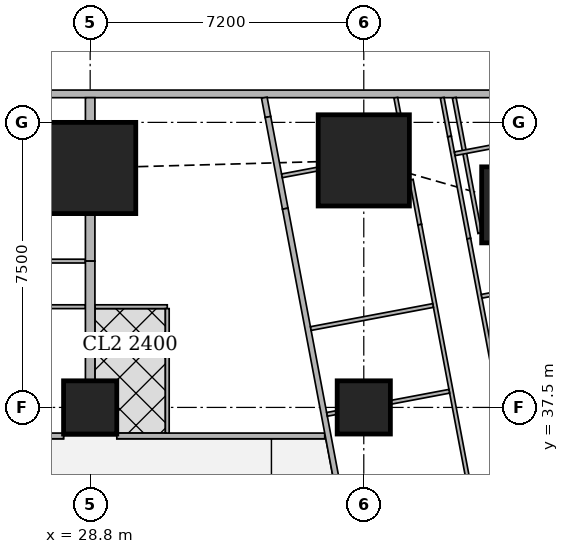
"""IFC4 building model, lengths in metres.
Left out: names, types, materials, properties, quantities, classifications, styles, units other than length and angle.
Written with IfcOpenShell. Run it as: python <this file> out.ifc"""

import sys

from ifc_helpers import new_model, si_unit, direction, frame, frame_2d, origin, origin_2d, place, context, subcontext, project, spatial, rectangle, extrude, element, fill, save


model = new_model("IFC4")
c1 = context("Model", 3, precision=1e-05, world=origin(), true_north=direction((0.0, 1.0)))
c2 = subcontext(c1, "Body", "Model", "MODEL_VIEW")
j1 = project(units=[si_unit("LENGTHUNIT", "METRE"), si_unit("PLANEANGLEUNIT", "RADIAN")], contexts=[c1])
p1 = place(None, origin())
s1 = spatial("IfcSite", under=j1, at=p1, CompositionType="ELEMENT")
p2 = place(p1, origin())
s2 = spatial("IfcBuilding", under=s1, at=p2, CompositionType="ELEMENT")
p3 = place(p2, frame((0.0, 0.0, 193.7)))
s3 = spatial("IfcBuildingStorey", under=s2, at=p3, CompositionType="ELEMENT", Elevation=193.7)
for number, where, z_axis, x_axis in (
    (1, (28.8, 37.5, 0.0), (0.0, 0.0, 1.0), (1.0, 0.0, 0.0)),
    (2, (36.0, 37.5, 0.0), (0.0, 0.0, 1.0), (1.0, 0.0, 0.0)),
):
    element("IfcColumn", number, at=place(p3, frame(where, z_axis=z_axis, x_axis=x_axis)), inside=s3, PredefinedType="COLUMN", context=c2, shape_type="SweptSolid", body=[
        extrude(rectangle(XDim=1.4, YDim=1.4, at=origin_2d()), origin(), (0.0, 0.0, 1.0), 3.75),
    ])
p4 = place(p3, frame((40.102, 42.83, 0.0), z_axis=(0.0, 0.0, 1.0), x_axis=(1.0, 0.0, 0.0)))
e3 = element("IfcColumn", 3, at=p4, inside=s3, PredefinedType="COLUMN", context=c2, shape_type="SweptSolid", body=[
    extrude(rectangle(XDim=2.0, YDim=2.0, at=origin_2d()), origin(), (0.0, 0.0, 1.0), 3.75),
])
for number, where, z_axis, x_axis in (
    (4, (28.8, 43.8, 0.0), (0.0, 0.0, 1.0), (1.0, 0.0, 0.0)),
    (5, (36.0, 44.0, 0.0), (0.0, 0.0, 1.0), (1.0, 0.0, 0.0)),
):
    element("IfcColumn", number, at=place(p3, frame(where, z_axis=z_axis, x_axis=x_axis)), inside=s3, PredefinedType="COLUMN", context=c2, shape_type="SweptSolid", body=[
        extrude(rectangle(XDim=2.4, YDim=2.4, at=origin_2d()), origin(), (0.0, 0.0, 1.0), 3.75),
    ])
p5 = place(p3, frame((40.106, 45.75, 0.0), z_axis=(0.0, 0.0, 1.0), x_axis=(-1.0, 0.0, 0.0)))
e6 = element("IfcWall", 6, at=p5, inside=s3, PredefinedType="SOLIDWALL", context=c2, shape_type="SweptSolid", body=[
    extrude(rectangle(XDim=32.743, YDim=0.2, at=frame_2d((16.372, 0.0))), origin(), (0.0, 0.0, 1.0), 3.5),
])
p6 = place(p5, frame((8.606, 0.0, 0.9)))
e7 = element("IfcOpeningElement", 7, at=p6, cuts=e6, PredefinedType="OPENING", context=c2, shape_type="SweptSolid", body=[
    extrude(rectangle(XDim=1.8, YDim=1.5, at=frame_2d((0.9, 0.75))), frame((0.0, 0.11, 0.0), z_axis=(0.0, -1.0, 0.0), x_axis=(1.0, 0.0, 0.0)), (0.0, 0.0, 1.0), 0.22),
])
p7 = place(p5, frame((12.206, 0.0, 0.9)))
e8 = element("IfcOpeningElement", 8, at=p7, cuts=e6, PredefinedType="OPENING", context=c2, shape_type="SweptSolid", body=[
    extrude(rectangle(XDim=1.8, YDim=1.5, at=frame_2d((0.9, 0.75))), frame((0.0, 0.11, 0.0), z_axis=(0.0, -1.0, 0.0), x_axis=(1.0, 0.0, 0.0)), (0.0, 0.0, 1.0), 0.22),
])
p8 = place(p5, frame((15.806, 0.0, 0.9)))
e9 = element("IfcOpeningElement", 9, at=p8, cuts=e6, PredefinedType="OPENING", context=c2, shape_type="SweptSolid", body=[
    extrude(rectangle(XDim=1.8, YDim=1.5, at=frame_2d((0.9, 0.75))), frame((0.0, 0.11, 0.0), z_axis=(0.0, -1.0, 0.0), x_axis=(1.0, 0.0, 0.0)), (0.0, 0.0, 1.0), 0.22),
])
p9 = place(p5, frame((19.406, 0.0, 0.9)))
e10 = element("IfcOpeningElement", 10, at=p9, cuts=e6, PredefinedType="OPENING", context=c2, shape_type="SweptSolid", body=[
    extrude(rectangle(XDim=1.8, YDim=1.5, at=frame_2d((0.9, 0.75))), frame((0.0, 0.11, 0.0), z_axis=(0.0, -1.0, 0.0), x_axis=(1.0, 0.0, 0.0)), (0.0, 0.0, 1.0), 0.22),
])
p10 = place(p5, frame((23.006, 0.0, 0.9)))
e11 = element("IfcOpeningElement", 11, at=p10, cuts=e6, PredefinedType="OPENING", context=c2, shape_type="SweptSolid", body=[
    extrude(rectangle(XDim=1.8, YDim=1.5, at=frame_2d((0.9, 0.75))), frame((0.0, 0.11, 0.0), z_axis=(0.0, -1.0, 0.0), x_axis=(1.0, 0.0, 0.0)), (0.0, 0.0, 1.0), 0.22),
])
p11 = place(p5, frame((28.025, 0.0, 0.9)))
e12 = element("IfcOpeningElement", 12, at=p11, cuts=e6, PredefinedType="OPENING", context=c2, shape_type="SweptSolid", body=[
    extrude(rectangle(XDim=2.4, YDim=1.5, at=frame_2d((1.2, 0.75))), frame((0.0, 0.11, 0.0), z_axis=(0.0, -1.0, 0.0), x_axis=(1.0, 0.0, 0.0)), (0.0, 0.0, 1.0), 0.22),
])
p12 = place(p3, frame((22.301, 36.75, 0.0), z_axis=(0.0, 0.0, 1.0), x_axis=(1.0, 0.0, 0.0)))
e13 = element("IfcWall", 13, at=p12, inside=s3, PredefinedType="SOLIDWALL", context=c2, shape_type="SweptSolid", body=[
    extrude(rectangle(XDim=5.798, YDim=0.15, at=frame_2d((2.899, 0.0))), origin(), (0.0, 0.0, 1.0), 3.5),
])
p13 = place(p3, frame((29.501, 36.75, 0.0), z_axis=(0.0, 0.0, 1.0), x_axis=(1.0, 0.0, 0.0)))
e14 = element("IfcWall", 14, at=p13, inside=s3, PredefinedType="SOLIDWALL", context=c2, shape_type="SweptSolid", body=[
    extrude(rectangle(XDim=5.471, YDim=0.15, at=frame_2d((2.735, 0.0))), origin(), (0.0, 0.0, 1.0), 3.5),
])
p14 = place(p13, frame((2.945, 0.0, 0.0)))
e15 = element("IfcOpeningElement", 15, at=p14, cuts=e14, PredefinedType="OPENING", context=c2, shape_type="SweptSolid", body=[
    extrude(rectangle(XDim=1.0, YDim=2.1, at=frame_2d((0.5, 1.05))), frame((0.0, 0.085, 0.0), z_axis=(0.0, -1.0, 0.0), x_axis=(1.0, 0.0, 0.0)), (0.0, 0.0, 1.0), 0.17),
])
p15 = place(p3, frame((33.382, 45.65, 0.0), z_axis=(0.0, 0.0, 1.0), x_axis=(0.185657456326, -0.982614527122, 0.0)))
e16 = element("IfcWall", 16, at=p15, inside=s3, PredefinedType="SOLIDWALL", context=c2, shape_type="SweptSolid", body=[
    extrude(rectangle(XDim=0.517, YDim=0.15, at=frame_2d((0.258, 0.0))), origin(), (0.0, 0.0, 1.0), 3.5),
])
p16 = place(p3, frame((33.478, 45.142, 0.0), z_axis=(0.0, 0.0, 1.0), x_axis=(0.185393362436, -0.982664388876, 0.0)))
e17 = element("IfcWall", 17, at=p16, inside=s3, PredefinedType="SOLIDWALL", context=c2, shape_type="SweptSolid", body=[
    extrude(rectangle(XDim=2.455, YDim=0.15, at=frame_2d((1.227, 0.0))), origin(), (0.0, 0.0, 1.0), 2.05),
])
p17 = place(p3, frame((33.933, 42.73, 0.0), z_axis=(0.0, 0.0, 1.0), x_axis=(0.185595417643, -0.982626246825, 0.0)))
e18 = element("IfcWall", 18, at=p17, inside=s3, PredefinedType="SOLIDWALL", context=c2, shape_type="SweptSolid", body=[
    extrude(rectangle(XDim=41.051, YDim=0.15, at=frame_2d((20.525, 0.0))), origin(), (0.0, 0.0, 1.0), 2.5),
])
p18 = place(p17, frame((16.082, 0.0, 0.0)))
e19 = element("IfcOpeningElement", 19, at=p18, cuts=e18, PredefinedType="OPENING", context=c2, shape_type="SweptSolid", body=[
    extrude(rectangle(XDim=1.0, YDim=2.1, at=frame_2d((0.5, 1.05))), frame((0.0, 0.085, 0.0), z_axis=(0.0, -1.0, 0.0), x_axis=(1.0, 0.0, 0.0)), (0.0, 0.0, 1.0), 0.17),
])
p19 = place(p17, frame((19.898, 0.0, 0.0)))
e20 = element("IfcOpeningElement", 20, at=p19, cuts=e18, PredefinedType="OPENING", context=c2, shape_type="SweptSolid", body=[
    extrude(rectangle(XDim=1.0, YDim=2.1, at=frame_2d((0.5, 1.05))), frame((0.0, 0.085, 0.0), z_axis=(0.0, -1.0, 0.0), x_axis=(1.0, 0.0, 0.0)), (0.0, 0.0, 1.0), 0.17),
])
p20 = place(p17, frame((30.862, 0.0, 0.0)))
e21 = element("IfcOpeningElement", 21, at=p20, cuts=e18, PredefinedType="OPENING", context=c2, shape_type="SweptSolid", body=[
    extrude(rectangle(XDim=1.0, YDim=2.1, at=frame_2d((0.5, 1.05))), frame((0.0, 0.085, 0.0), z_axis=(0.0, -1.0, 0.0), x_axis=(1.0, 0.0, 0.0)), (0.0, 0.0, 1.0), 0.17),
])
p21 = place(p3, frame((39.054, 42.085, 0.0), z_axis=(0.0, 0.0, 1.0), x_axis=(-0.185791584218, 0.982589175207, 0.0)))
e22 = element("IfcWall", 22, at=p21, inside=s3, PredefinedType="PARTITIONING", context=c2, shape_type="SweptSolid", body=[
    extrude(rectangle(XDim=3.628, YDim=0.1, at=frame_2d((1.814, 0.0))), origin(), (0.0, 0.0, 1.0), 2.05),
])
p22 = place(p3, frame((38.063, 45.65, 0.0), z_axis=(0.0, 0.0, 1.0), x_axis=(0.185677287841, -0.982610779902, 0.0)))
e23 = element("IfcWall", 23, at=p22, inside=s3, PredefinedType="PARTITIONING", context=c2, shape_type="SweptSolid", body=[
    extrude(rectangle(XDim=1.04, YDim=0.1, at=frame_2d((0.52, 0.0))), origin(), (0.0, 0.0, 1.0), 3.5),
])
p23 = place(p3, frame((38.256, 44.628, 0.0), z_axis=(0.0, 0.0, 1.0), x_axis=(0.185700639943, -0.982606366927, 0.0)))
e24 = element("IfcWall", 24, at=p23, inside=s3, PredefinedType="PARTITIONING", context=c2, shape_type="SweptSolid", body=[
    extrude(rectangle(XDim=2.735, YDim=0.1, at=frame_2d((1.367, 0.0))), origin(), (0.0, 0.0, 1.0), 2.05),
])
p24 = place(p3, frame((38.764, 41.941, 0.0), z_axis=(0.0, 0.0, 1.0), x_axis=(0.185512176227, -0.982641965556, 0.0)))
e25 = element("IfcWall", 25, at=p24, inside=s3, PredefinedType="PARTITIONING", context=c2, shape_type="SweptSolid", body=[
    extrude(rectangle(XDim=12.792, YDim=0.1, at=frame_2d((6.396, 0.0))), origin(), (0.0, 0.0, 1.0), 2.5),
])
p25 = place(p24, frame((11.35, 0.0, 0.0)))
e26 = element("IfcOpeningElement", 26, at=p25, cuts=e25, PredefinedType="OPENING", context=c2, shape_type="SweptSolid", body=[
    extrude(rectangle(XDim=0.9, YDim=2.1, at=frame_2d((0.45, 1.05))), frame((0.0, 0.06, 0.0), z_axis=(0.0, -1.0, 0.0), x_axis=(1.0, 0.0, 0.0)), (0.0, 0.0, 1.0), 0.12),
])
p26 = place(p24, frame((8.085, 0.0, 0.0)))
e27 = element("IfcOpeningElement", 27, at=p26, cuts=e25, PredefinedType="OPENING", context=c2, shape_type="SweptSolid", body=[
    extrude(rectangle(XDim=0.9, YDim=2.1, at=frame_2d((0.45, 1.05))), frame((0.0, 0.06, 0.0), z_axis=(0.0, -1.0, 0.0), x_axis=(1.0, 0.0, 0.0)), (0.0, 0.0, 1.0), 0.12),
])
p27 = place(p24, frame((3.7, 0.0, 0.0)))
e28 = element("IfcOpeningElement", 28, at=p27, cuts=e25, PredefinedType="OPENING", context=c2, shape_type="SweptSolid", body=[
    extrude(rectangle(XDim=0.9, YDim=2.1, at=frame_2d((0.45, 1.05))), frame((0.0, 0.06, 0.0), z_axis=(0.0, -1.0, 0.0), x_axis=(1.0, 0.0, 0.0)), (0.0, 0.0, 1.0), 0.12),
])
p28 = place(p3, frame((36.842, 45.65, 0.0), z_axis=(0.0, 0.0, 1.0), x_axis=(0.185407859198, -0.982661653748, 0.0)))
e29 = element("IfcWall", 29, at=p28, inside=s3, PredefinedType="PARTITIONING", context=c2, shape_type="SweptSolid", body=[
    extrude(rectangle(XDim=0.448, YDim=0.1, at=frame_2d((0.224, 0.0))), origin(), (0.0, 0.0, 1.0), 3.5),
])
p29 = place(p3, frame((37.249, 43.493, 0.0), z_axis=(0.0, 0.0, 1.0), x_axis=(0.185817643817, -0.982584247404, 0.0)))
e30 = element("IfcWall", 30, at=p29, inside=s3, PredefinedType="PARTITIONING", context=c2, shape_type="SweptSolid", body=[
    extrude(rectangle(XDim=1.205, YDim=0.1, at=frame_2d((0.603, 0.0))), origin(), (0.0, 0.0, 1.0), 2.05),
])
p30 = place(p3, frame((37.473, 42.309, 0.0), z_axis=(0.0, 0.0, 1.0), x_axis=(0.185570636839, -0.982630927024, 0.0)))
e31 = element("IfcWall", 31, at=p30, inside=s3, PredefinedType="PARTITIONING", context=c2, shape_type="SweptSolid", body=[
    extrude(rectangle(XDim=13.553, YDim=0.1, at=frame_2d((6.777, 0.0))), origin(), (0.0, 0.0, 1.0), 2.5),
])
p31 = place(p30, frame((12.049, 0.0, 0.0)))
e32 = element("IfcOpeningElement", 32, at=p31, cuts=e31, PredefinedType="OPENING", context=c2, shape_type="SweptSolid", body=[
    extrude(rectangle(XDim=0.9, YDim=2.1, at=frame_2d((0.45, 1.05))), frame((0.0, 0.06, 0.0), z_axis=(0.0, -1.0, 0.0), x_axis=(1.0, 0.0, 0.0)), (0.0, 0.0, 1.0), 0.12),
])
p32 = place(p30, frame((8.427, 0.0, 0.0)))
e33 = element("IfcOpeningElement", 33, at=p32, cuts=e31, PredefinedType="OPENING", context=c2, shape_type="SweptSolid", body=[
    extrude(rectangle(XDim=0.9, YDim=2.1, at=frame_2d((0.45, 1.05))), frame((0.0, 0.06, 0.0), z_axis=(0.0, -1.0, 0.0), x_axis=(1.0, 0.0, 0.0)), (0.0, 0.0, 1.0), 0.12),
])
p33 = place(p30, frame((2.853, 0.0, 0.0)))
e34 = element("IfcOpeningElement", 34, at=p33, cuts=e31, PredefinedType="OPENING", context=c2, shape_type="SweptSolid", body=[
    extrude(rectangle(XDim=0.9, YDim=2.1, at=frame_2d((0.45, 1.05))), frame((0.0, 0.06, 0.0), z_axis=(0.0, -1.0, 0.0), x_axis=(1.0, 0.0, 0.0)), (0.0, 0.0, 1.0), 0.12),
])
p34 = place(p30, frame((10.14, 0.0, 0.0)))
e35 = element("IfcOpeningElement", 35, at=p34, cuts=e31, PredefinedType="OPENING", context=c2, shape_type="SweptSolid", body=[
    extrude(rectangle(XDim=0.9, YDim=2.1, at=frame_2d((0.45, 1.05))), frame((0.0, 0.06, 0.0), z_axis=(0.0, -1.0, 0.0), x_axis=(1.0, 0.0, 0.0)), (0.0, 0.0, 1.0), 0.12),
])
p35 = place(p30, frame((5.759, 0.0, 0.0)))
e36 = element("IfcOpeningElement", 36, at=p35, cuts=e31, PredefinedType="OPENING", context=c2, shape_type="SweptSolid", body=[
    extrude(rectangle(XDim=0.9, YDim=2.1, at=frame_2d((0.45, 1.05))), frame((0.0, 0.06, 0.0), z_axis=(0.0, -1.0, 0.0), x_axis=(1.0, 0.0, 0.0)), (0.0, 0.0, 1.0), 0.12),
])
p36 = place(p3, frame((41.968, 44.85, 0.0), z_axis=(0.0, 0.0, 1.0), x_axis=(-0.98258614234, -0.185807623311, 0.0)))
e37 = element("IfcWall", 37, at=p36, inside=s3, PredefinedType="PARTITIONING", context=c2, shape_type="SweptSolid", body=[
    extrude(rectangle(XDim=3.638, YDim=0.1, at=frame_2d((1.819, 0.0))), origin(), (0.0, 0.0, 1.0), 2.05),
])
p37 = place(p3, frame((43.277, 41.212, 0.0), z_axis=(0.0, 0.0, 1.0), x_axis=(-0.982665405803, -0.185387972203, 0.0)))
e38 = element("IfcWall", 38, at=p37, inside=s3, PredefinedType="PARTITIONING", context=c2, shape_type="SweptSolid", body=[
    extrude(rectangle(XDim=4.25, YDim=0.1, at=frame_2d((2.125, 0.0))), origin(), (0.0, 0.0, 1.0), 2.05),
])
p38 = place(p3, frame((34.79, 43.772, 0.0), z_axis=(0.0, 0.0, 1.0), x_axis=(-0.982655532093, -0.185440301034, 0.0)))
e39 = element("IfcWall", 39, at=p38, inside=s3, PredefinedType="PARTITIONING", context=c2, shape_type="SweptSolid", body=[
    extrude(rectangle(XDim=0.96, YDim=0.1, at=frame_2d((0.48, 0.0))), origin(), (0.0, 0.0, 1.0), 2.05),
])
p39 = place(p3, frame((37.824, 40.182, 0.0), z_axis=(0.0, 0.0, 1.0), x_axis=(-0.982674977865, -0.185337227447, 0.0)))
e40 = element("IfcWall", 40, at=p39, inside=s3, PredefinedType="PARTITIONING", context=c2, shape_type="SweptSolid", body=[
    extrude(rectangle(XDim=3.275, YDim=0.1, at=frame_2d((1.637, 0.0))), origin(), (0.0, 0.0, 1.0), 3.5),
])
p40 = place(p3, frame((38.25, 37.925, 0.0), z_axis=(0.0, 0.0, 1.0), x_axis=(-0.982610209589, -0.185680305934, 0.0)))
e41 = element("IfcWall", 41, at=p40, inside=s3, PredefinedType="PARTITIONING", context=c2, shape_type="SweptSolid", body=[
    extrude(rectangle(XDim=1.567, YDim=0.1, at=frame_2d((0.784, 0.0))), origin(), (0.0, 0.0, 1.0), 3.5),
])
p41 = place(p3, frame((35.29, 37.366, 0.0), z_axis=(0.0, 0.0, 1.0), x_axis=(-0.982395465615, -0.18681313963, 0.0)))
e42 = element("IfcWall", 42, at=p41, inside=s3, PredefinedType="PARTITIONING", context=c2, shape_type="SweptSolid", body=[
    extrude(rectangle(XDim=0.263, YDim=0.1, at=frame_2d((0.131, 0.0))), origin(), (0.0, 0.0, 1.0), 3.5),
])
p42 = place(p3, frame((18.0, 41.35, 0.0), z_axis=(0.0, 0.0, 1.0), x_axis=(1.0, 0.0, 0.0)))
e43 = element("IfcWall", 43, at=p42, inside=s3, PredefinedType="PARTITIONING", context=c2, shape_type="SweptSolid", body=[
    extrude(rectangle(XDim=10.675, YDim=0.1, at=frame_2d((5.337, 0.0))), origin(), (0.0, 0.0, 1.0), 3.5),
])
p43 = place(p42, frame((0.2, 0.0, 0.0)))
e44 = element("IfcOpeningElement", 44, at=p43, cuts=e43, PredefinedType="OPENING", context=c2, shape_type="SweptSolid", body=[
    extrude(rectangle(XDim=0.9, YDim=2.1, at=frame_2d((0.45, 1.05))), frame((0.0, 0.06, 0.0), z_axis=(0.0, -1.0, 0.0), x_axis=(1.0, 0.0, 0.0)), (0.0, 0.0, 1.0), 0.12),
])
p44 = place(p42, frame((3.8, 0.0, 0.0)))
e45 = element("IfcOpeningElement", 45, at=p44, cuts=e43, PredefinedType="OPENING", context=c2, shape_type="SweptSolid", body=[
    extrude(rectangle(XDim=0.9, YDim=2.1, at=frame_2d((0.45, 1.05))), frame((0.0, 0.06, 0.0), z_axis=(0.0, -1.0, 0.0), x_axis=(1.0, 0.0, 0.0)), (0.0, 0.0, 1.0), 0.12),
])
p45 = place(p42, frame((7.4, 0.0, 0.0)))
e46 = element("IfcOpeningElement", 46, at=p45, cuts=e43, PredefinedType="OPENING", context=c2, shape_type="SweptSolid", body=[
    extrude(rectangle(XDim=0.9, YDim=2.1, at=frame_2d((0.45, 1.05))), frame((0.0, 0.06, 0.0), z_axis=(0.0, -1.0, 0.0), x_axis=(1.0, 0.0, 0.0)), (0.0, 0.0, 1.0), 0.12),
])
p46 = place(p3, frame((18.0, 40.15, 0.0), z_axis=(0.0, 0.0, 1.0), x_axis=(1.0, 0.0, 0.0)))
e47 = element("IfcWall", 47, at=p46, inside=s3, PredefinedType="PARTITIONING", context=c2, shape_type="SweptSolid", body=[
    extrude(rectangle(XDim=10.675, YDim=0.1, at=frame_2d((5.337, 0.0))), origin(), (0.0, 0.0, 1.0), 3.5),
])
p47 = place(p46, frame((0.655, 0.0, 0.0)))
e48 = element("IfcOpeningElement", 48, at=p47, cuts=e47, PredefinedType="OPENING", context=c2, shape_type="SweptSolid", body=[
    extrude(rectangle(XDim=0.9, YDim=2.1, at=frame_2d((0.45, 1.05))), frame((0.0, 0.06, 0.0), z_axis=(0.0, -1.0, 0.0), x_axis=(1.0, 0.0, 0.0)), (0.0, 0.0, 1.0), 0.12),
])
p48 = place(p46, frame((3.95, 0.0, 0.0)))
e49 = element("IfcOpeningElement", 49, at=p48, cuts=e47, PredefinedType="OPENING", context=c2, shape_type="SweptSolid", body=[
    extrude(rectangle(XDim=0.9, YDim=2.1, at=frame_2d((0.45, 1.05))), frame((0.0, 0.06, 0.0), z_axis=(0.0, -1.0, 0.0), x_axis=(1.0, 0.0, 0.0)), (0.0, 0.0, 1.0), 0.12),
])
p49 = place(p46, frame((7.66, 0.0, 0.0)))
e50 = element("IfcOpeningElement", 50, at=p49, cuts=e47, PredefinedType="OPENING", context=c2, shape_type="SweptSolid", body=[
    extrude(rectangle(XDim=0.9, YDim=2.1, at=frame_2d((0.45, 1.05))), frame((0.0, 0.06, 0.0), z_axis=(0.0, -1.0, 0.0), x_axis=(1.0, 0.0, 0.0)), (0.0, 0.0, 1.0), 0.12),
])
p50 = place(p46, frame((2.455, 0.0, 0.0)))
e51 = element("IfcOpeningElement", 51, at=p50, cuts=e47, PredefinedType="OPENING", context=c2, shape_type="SweptSolid", body=[
    extrude(rectangle(XDim=0.9, YDim=2.1, at=frame_2d((0.45, 1.05))), frame((0.0, 0.06, 0.0), z_axis=(0.0, -1.0, 0.0), x_axis=(1.0, 0.0, 0.0)), (0.0, 0.0, 1.0), 0.12),
])
p51 = place(p46, frame((5.75, 0.0, 0.0)))
e52 = element("IfcOpeningElement", 52, at=p51, cuts=e47, PredefinedType="OPENING", context=c2, shape_type="SweptSolid", body=[
    extrude(rectangle(XDim=0.9, YDim=2.1, at=frame_2d((0.45, 1.05))), frame((0.0, 0.06, 0.0), z_axis=(0.0, -1.0, 0.0), x_axis=(1.0, 0.0, 0.0)), (0.0, 0.0, 1.0), 0.12),
])
p52 = place(p46, frame((9.46, 0.0, 0.0)))
e53 = element("IfcOpeningElement", 53, at=p52, cuts=e47, PredefinedType="OPENING", context=c2, shape_type="SweptSolid", body=[
    extrude(rectangle(XDim=0.9, YDim=2.1, at=frame_2d((0.45, 1.05))), frame((0.0, 0.06, 0.0), z_axis=(0.0, -1.0, 0.0), x_axis=(1.0, 0.0, 0.0)), (0.0, 0.0, 1.0), 0.12),
])
p53 = place(p3, frame((28.925, 40.15, 0.0), z_axis=(0.0, 0.0, 1.0), x_axis=(1.0, 0.0, 0.0)))
e54 = element("IfcWall", 54, at=p53, inside=s3, PredefinedType="PARTITIONING", context=c2, shape_type="SweptSolid", body=[
    extrude(rectangle(XDim=1.904, YDim=0.1, at=frame_2d((0.952, 0.0))), origin(), (0.0, 0.0, 1.0), 3.5),
])
p54 = place(p53, frame((0.425, 0.0, 0.0)))
e55 = element("IfcOpeningElement", 55, at=p54, cuts=e54, PredefinedType="OPENING", context=c2, shape_type="SweptSolid", body=[
    extrude(rectangle(XDim=0.9, YDim=2.1, at=frame_2d((0.45, 1.05))), frame((0.0, 0.06, 0.0), z_axis=(0.0, -1.0, 0.0), x_axis=(1.0, 0.0, 0.0)), (0.0, 0.0, 1.0), 0.12),
])
p55 = place(p3, frame((30.829, 36.825, 0.0), z_axis=(0.0, 0.0, 1.0), x_axis=(0.0, 1.0, 0.0)))
e56 = element("IfcWall", 56, at=p55, inside=s3, PredefinedType="PARTITIONING", context=c2, shape_type="SweptSolid", body=[
    extrude(rectangle(XDim=3.275, YDim=0.1, at=frame_2d((1.638, 0.0))), origin(), (0.0, 0.0, 1.0), 3.5),
])
p56 = place(p3, frame((28.8, 41.35, 0.0), z_axis=(0.0, 0.0, 1.0), x_axis=(0.0, 1.0, 0.0)))
e57 = element("IfcWall", 57, at=p56, inside=s3, PredefinedType="SOLIDWALL", context=c2, shape_type="SweptSolid", body=[
    extrude(rectangle(XDim=1.249, YDim=0.25, at=frame_2d((0.625, 0.0))), origin(), (0.0, 0.0, 1.0), 2.05),
])
p57 = place(p3, frame((28.8, 45.001, 0.0), z_axis=(0.0, 0.0, 1.0), x_axis=(0.0, 1.0, 0.0)))
e58 = element("IfcWall", 58, at=p57, inside=s3, PredefinedType="SOLIDWALL", context=c2, shape_type="SweptSolid", body=[
    extrude(rectangle(XDim=0.649, YDim=0.25, at=frame_2d((0.324, 0.0))), origin(), (0.0, 0.0, 1.0), 2.05),
])
p58 = place(p3, frame((28.8, 38.201, 0.0), z_axis=(0.0, 0.0, 1.0), x_axis=(0.0, 1.0, 0.0)))
e59 = element("IfcWall", 59, at=p58, inside=s3, PredefinedType="SOLIDWALL", context=c2, shape_type="SweptSolid", body=[
    extrude(rectangle(XDim=3.149, YDim=0.25, at=frame_2d((1.575, 0.0))), origin(), (0.0, 0.0, 1.0), 3.5),
])
p59 = place(p6, origin())
e60 = element("IfcWindow", 60, at=p59, inside=s3, PartitioningType="SINGLE_PANEL", PredefinedType="WINDOW", context=c2, shape_type="SweptSolid", body=[
    extrude(rectangle(XDim=1.8, YDim=1.5, at=frame_2d((0.9, 0.75))), frame((0.0, 0.03, 0.0), z_axis=(0.0, -1.0, 0.0), x_axis=(1.0, 0.0, 0.0)), (0.0, 0.0, 1.0), 0.06),
])
fill(e7, e60)
p60 = place(p7, origin())
e61 = element("IfcWindow", 61, at=p60, inside=s3, PartitioningType="SINGLE_PANEL", PredefinedType="WINDOW", context=c2, shape_type="SweptSolid", body=[
    extrude(rectangle(XDim=1.8, YDim=1.5, at=frame_2d((0.9, 0.75))), frame((0.0, 0.03, 0.0), z_axis=(0.0, -1.0, 0.0), x_axis=(1.0, 0.0, 0.0)), (0.0, 0.0, 1.0), 0.06),
])
fill(e8, e61)
p61 = place(p33, origin())
e62 = element("IfcDoor", 62, at=p61, inside=s3, OperationType="SINGLE_SWING_RIGHT", PredefinedType="DOOR", context=c2, shape_type="SweptSolid", body=[
    extrude(rectangle(XDim=0.9, YDim=2.1, at=frame_2d((0.45, 1.05))), frame((0.0, 0.025, 0.0), z_axis=(0.0, -1.0, 0.0), x_axis=(1.0, 0.0, 0.0)), (0.0, 0.0, 1.0), 0.05),
])
fill(e34, e62)
p62 = place(p35, origin())
e63 = element("IfcDoor", 63, at=p62, inside=s3, OperationType="SINGLE_SWING_LEFT", PredefinedType="DOOR", context=c2, shape_type="SweptSolid", body=[
    extrude(rectangle(XDim=0.9, YDim=2.1, at=frame_2d((0.45, 1.05))), frame((0.0, 0.025, 0.0), z_axis=(0.0, -1.0, 0.0), x_axis=(1.0, 0.0, 0.0)), (0.0, 0.0, 1.0), 0.05),
])
fill(e36, e63)
p63 = place(p52, origin())
e64 = element("IfcDoor", 64, at=p63, inside=s3, OperationType="SINGLE_SWING_LEFT", PredefinedType="DOOR", context=c2, shape_type="SweptSolid", body=[
    extrude(rectangle(XDim=0.9, YDim=2.1, at=frame_2d((0.45, 1.05))), frame((0.0, 0.025, 0.0), z_axis=(0.0, -1.0, 0.0), x_axis=(1.0, 0.0, 0.0)), (0.0, 0.0, 1.0), 0.05),
])
fill(e53, e64)
p64 = place(p54, origin())
e65 = element("IfcDoor", 65, at=p64, inside=s3, OperationType="SINGLE_SWING_RIGHT", PredefinedType="DOOR", context=c2, shape_type="SweptSolid", body=[
    extrude(rectangle(XDim=0.9, YDim=2.1, at=frame_2d((0.45, 1.05))), frame((0.0, 0.025, 0.0), z_axis=(0.0, -1.0, 0.0), x_axis=(1.0, 0.0, 0.0)), (0.0, 0.0, 1.0), 0.05),
])
fill(e55, e65)
p65 = place(p14, origin())
e66 = element("IfcDoor", 66, at=p65, inside=s3, OperationType="SINGLE_SWING_RIGHT", PredefinedType="DOOR", context=c2, shape_type="SweptSolid", body=[
    extrude(rectangle(XDim=1.0, YDim=2.1, at=frame_2d((0.5, 1.05))), frame((0.0, 0.025, 0.0), z_axis=(0.0, -1.0, 0.0), x_axis=(1.0, 0.0, 0.0)), (0.0, 0.0, 1.0), 0.05),
])
fill(e15, e66)
save(model, sys.argv[1])
